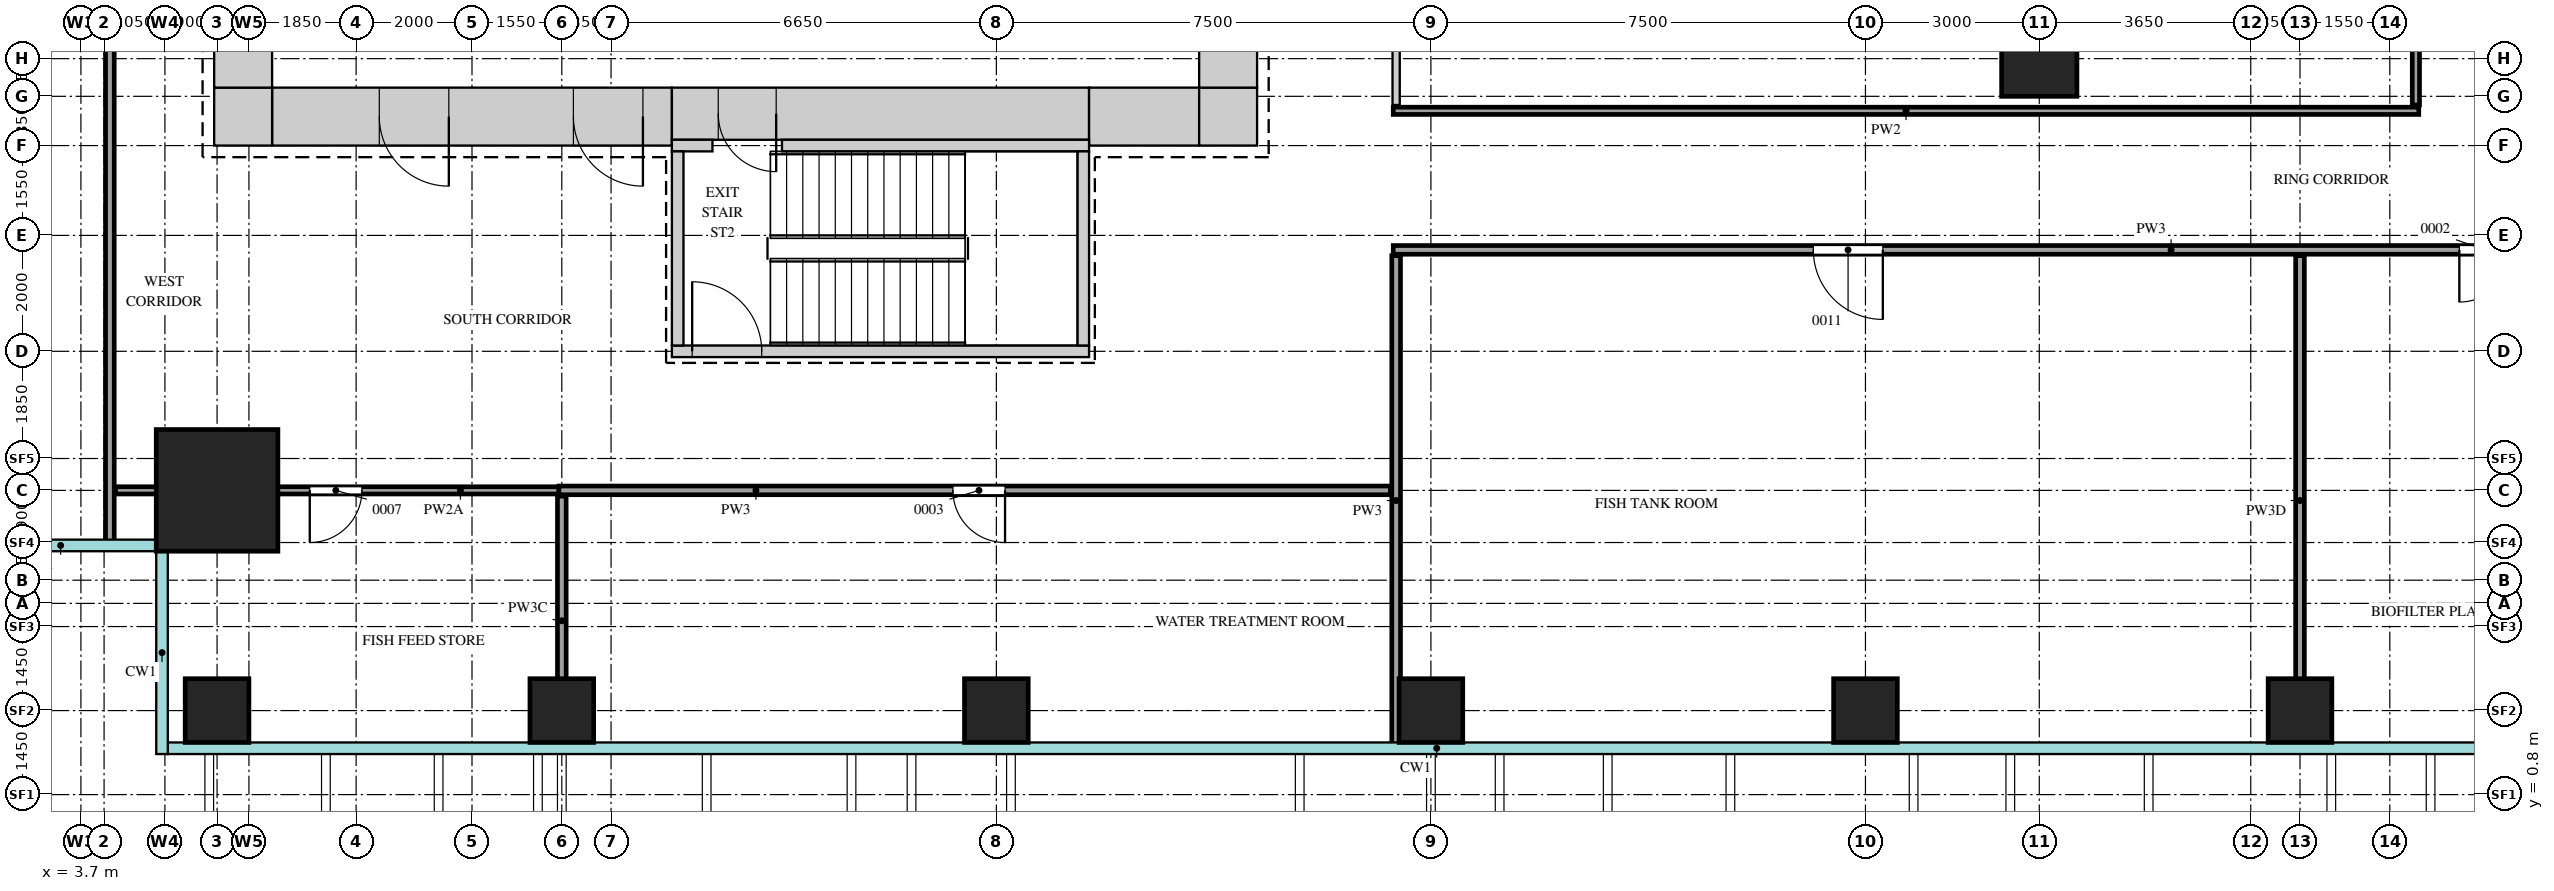
"""IFC4 building model, lengths in metres.
Left out: names, types, materials, properties, quantities, classifications, styles, units other than length and angle.
Written with IfcOpenShell. Run it as: python <this file> out.ifc"""

import sys

from ifc_helpers import new_model, si_unit, direction, frame, frame_2d, origin, origin_2d, place, context, subcontext, project, spatial, rectangle, extrude, source, transform, mapped, element, fill, save


model = new_model("IFC4")
c1 = context("Model", 3, precision=1e-05, world=origin(), true_north=direction((0.0, 1.0)))
c2 = subcontext(c1, "Body", "Model", "MODEL_VIEW")
j1 = project(units=[si_unit("LENGTHUNIT", "METRE"), si_unit("PLANEANGLEUNIT", "RADIAN")], contexts=[c1])
p1 = place(None, origin())
s1 = spatial("IfcSite", under=j1, at=p1, CompositionType="ELEMENT")
p2 = place(p1, origin())
s2 = spatial("IfcBuilding", under=s1, at=p2, CompositionType="ELEMENT")
p3 = place(p2, frame((0.0, 0.0, 141.1)))
s3 = spatial("IfcBuildingStorey", under=s2, at=p3, CompositionType="ELEMENT", Elevation=141.1)
m1 = source(origin(), c2, "Body", "SweptSolid", [
    extrude(rectangle(XDim=6.9, YDim=1.0, at=frame_2d((3.45, 0.0))), origin(), (0.0, 0.0, 1.0), 4.1),
])
p4 = place(p3, frame((7.0, 12.5, 0.0), z_axis=(0.0, 0.0, 1.0), x_axis=(1.0, 0.0, 0.0)))
e1 = element("IfcWall", 1, at=p4, inside=s3, PredefinedType="SHEAR", context=c2, shape_type="MappedRepresentation", body=[
    mapped(m1, transform((0.0, 0.0, 0.0))),
])
m2 = source(origin(), c2, "Body", "SweptSolid", [
    extrude(rectangle(XDim=1.2, YDim=2.1, at=frame_2d((0.6, 1.05))), frame((0.0, 0.51, 0.0), z_axis=(0.0, -1.0, 0.0), x_axis=(1.0, 0.0, 0.0)), (0.0, 0.0, 1.0), 1.02),
])
p5 = place(p4, frame((5.2, 0.0, 0.0)))
e2 = element("IfcOpeningElement", 2, at=p5, cuts=e1, PredefinedType="OPENING", context=c2, shape_type="MappedRepresentation", body=[
    mapped(m2, transform((0.0, 0.0, 0.0))),
])
p6 = place(p4, frame((1.85, 0.0, 0.0)))
e3 = element("IfcOpeningElement", 3, at=p6, cuts=e1, PredefinedType="OPENING", context=c2, shape_type="MappedRepresentation", body=[
    mapped(m2, transform((0.0, 0.0, 0.0))),
])
m3 = source(origin(), c2, "Body", "SweptSolid", [
    extrude(rectangle(XDim=7.2, YDim=0.9, at=frame_2d((3.6, 0.0))), origin(), (0.0, 0.0, 1.0), 4.1),
])
p7 = place(p3, frame((13.9, 12.55, 0.0), z_axis=(0.0, 0.0, 1.0), x_axis=(1.0, 0.0, 0.0)))
e4 = element("IfcWall", 4, at=p7, inside=s3, PredefinedType="SHEAR", context=c2, shape_type="MappedRepresentation", body=[
    mapped(m3, transform((0.0, 0.0, 0.0))),
])
m4 = source(origin(), c2, "Body", "SweptSolid", [
    extrude(rectangle(XDim=1.0, YDim=2.1, at=frame_2d((0.5, 1.05))), frame((0.0, 0.46, 0.0), z_axis=(0.0, -1.0, 0.0), x_axis=(1.0, 0.0, 0.0)), (0.0, 0.0, 1.0), 0.92),
])
p8 = place(p7, frame((0.8, 0.0, 0.0)))
e5 = element("IfcOpeningElement", 5, at=p8, cuts=e4, PredefinedType="OPENING", context=c2, shape_type="MappedRepresentation", body=[
    mapped(m4, transform((0.0, 0.0, 0.0))),
])
m5 = source(origin(), c2, "Body", "SweptSolid", [
    extrude(rectangle(XDim=1.9, YDim=1.0, at=frame_2d((0.95, 0.0))), origin(), (0.0, 0.0, 1.0), 4.1),
])
p9 = place(p3, frame((21.1, 12.5, 0.0), z_axis=(0.0, 0.0, 1.0), x_axis=(1.0, 0.0, 0.0)))
e6 = element("IfcWall", 6, at=p9, inside=s3, PredefinedType="SHEAR", context=c2, shape_type="MappedRepresentation", body=[
    mapped(m5, transform((0.0, 0.0, 0.0))),
])
m6 = source(origin(), c2, "Body", "SweptSolid", [
    extrude(rectangle(XDim=1.0, YDim=1.0, at=frame_2d((0.5, 0.0))), origin(), (0.0, 0.0, 1.0), 4.1),
])
for number, where, z_axis, x_axis in (
    (7, (23.0, 12.5, 0.0), (0.0, 0.0, 1.0), (1.0, 0.0, 0.0)),
    (8, (6.0, 12.5, 0.0), (0.0, 0.0, 1.0), (1.0, 0.0, 0.0)),
):
    element("IfcWall", number, at=place(p3, frame(where, z_axis=z_axis, x_axis=x_axis)), inside=s3, PredefinedType="SHEAR", context=c2, shape_type="MappedRepresentation", body=[
        mapped(m6, transform((0.0, 0.0, 0.0))),
    ])
m7 = source(origin(), c2, "Body", "SweptSolid", [
    extrude(rectangle(XDim=28.0, YDim=1.0, at=frame_2d((14.0, 0.0))), origin(), (0.0, 0.0, 1.0), 4.1),
])
p10 = place(p3, frame((23.5, 13.0, 0.0), z_axis=(0.0, 0.0, 1.0), x_axis=(0.0, 1.0, 0.0)))
e9 = element("IfcWall", 9, at=p10, inside=s3, PredefinedType="SHEAR", context=c2, shape_type="MappedRepresentation", body=[
    mapped(m7, transform((0.0, 0.0, 0.0))),
])
m8 = source(origin(), c2, "Body", "SweptSolid", [
    extrude(rectangle(XDim=1.8, YDim=2.1, at=frame_2d((0.9, 1.05))), frame((0.0, 0.51, 0.0), z_axis=(0.0, -1.0, 0.0), x_axis=(1.0, 0.0, 0.0)), (0.0, 0.0, 1.0), 1.02),
])
p11 = place(p10, frame((22.6, 0.0, 0.0)))
e10 = element("IfcOpeningElement", 10, at=p11, cuts=e9, PredefinedType="OPENING", context=c2, shape_type="MappedRepresentation", body=[
    mapped(m8, transform((0.0, 0.0, 0.0))),
])
p12 = place(p10, frame((12.35, 0.0, 0.0)))
e11 = element("IfcOpeningElement", 11, at=p12, cuts=e9, PredefinedType="OPENING", context=c2, shape_type="MappedRepresentation", body=[
    mapped(m2, transform((0.0, 0.0, 0.0))),
])
m9 = source(origin(), c2, "Body", "SweptSolid", [
    extrude(rectangle(XDim=0.9, YDim=2.1, at=frame_2d((0.45, 1.05))), frame((0.0, 0.51, 0.0), z_axis=(0.0, -1.0, 0.0), x_axis=(1.0, 0.0, 0.0)), (0.0, 0.0, 1.0), 1.02),
])
p13 = place(p10, frame((4.6, 0.0, 0.0)))
e12 = element("IfcOpeningElement", 12, at=p13, cuts=e9, PredefinedType="OPENING", context=c2, shape_type="MappedRepresentation", body=[
    mapped(m9, transform((0.0, 0.0, 0.0))),
])
p14 = place(p3, frame((6.5, 13.0, 0.0), z_axis=(0.0, 0.0, 1.0), x_axis=(0.0, 1.0, 0.0)))
e13 = element("IfcWall", 13, at=p14, inside=s3, PredefinedType="SHEAR", context=c2, shape_type="MappedRepresentation", body=[
    mapped(m7, transform((0.0, 0.0, 0.0))),
])
m10 = source(origin(), c2, "Body", "SweptSolid", [
    extrude(rectangle(XDim=0.7, YDim=0.2, at=frame_2d((0.35, 0.0))), origin(), (0.0, 0.0, 1.0), 4.1),
])
p15 = place(p3, frame((13.9, 12.0, 0.0), z_axis=(0.0, 0.0, 1.0), x_axis=(1.0, 0.0, 0.0)))
e14 = element("IfcWall", 14, at=p15, inside=s3, PredefinedType="SHEAR", context=c2, shape_type="MappedRepresentation", body=[
    mapped(m10, transform((0.0, 0.0, 0.0))),
])
m11 = source(origin(), c2, "Body", "SweptSolid", [
    extrude(rectangle(XDim=5.3, YDim=0.2, at=frame_2d((2.65, 0.0))), origin(), (0.0, 0.0, 1.0), 4.1),
])
p16 = place(p3, frame((15.8, 12.0, 0.0), z_axis=(0.0, 0.0, 1.0), x_axis=(1.0, 0.0, 0.0)))
e15 = element("IfcWall", 15, at=p16, inside=s3, PredefinedType="SHEAR", context=c2, shape_type="MappedRepresentation", body=[
    mapped(m11, transform((0.0, 0.0, 0.0))),
])
m12 = source(origin(), c2, "Body", "SweptSolid", [
    extrude(rectangle(XDim=7.2, YDim=0.2, at=frame_2d((3.6, 0.0))), origin(), (0.0, 0.0, 1.0), 4.1),
])
p17 = place(p3, frame((13.9, 8.45, 0.0), z_axis=(0.0, 0.0, 1.0), x_axis=(1.0, 0.0, 0.0)))
e16 = element("IfcWall", 16, at=p17, inside=s3, PredefinedType="SHEAR", context=c2, shape_type="MappedRepresentation", body=[
    mapped(m12, transform((0.0, 0.0, 0.0))),
])
m13 = source(origin(), c2, "Body", "SweptSolid", [
    extrude(rectangle(XDim=1.2, YDim=2.1, at=frame_2d((0.6, 1.05))), frame((0.0, 0.11, 0.0), z_axis=(0.0, -1.0, 0.0), x_axis=(1.0, 0.0, 0.0)), (0.0, 0.0, 1.0), 0.22),
])
p18 = place(p17, frame((0.35, 0.0, 0.0)))
e17 = element("IfcOpeningElement", 17, at=p18, cuts=e16, PredefinedType="OPENING", context=c2, shape_type="MappedRepresentation", body=[
    mapped(m13, transform((0.0, 0.0, 0.0))),
])
m14 = source(origin(), c2, "Body", "SweptSolid", [
    extrude(rectangle(XDim=3.35, YDim=0.2, at=frame_2d((1.675, 0.0))), origin(), (0.0, 0.0, 1.0), 4.1),
])
for number, where, z_axis, x_axis in (
    (18, (21.0, 8.55, 0.0), (0.0, 0.0, 1.0), (0.0, 1.0, 0.0)),
    (19, (14.0, 8.55, 0.0), (0.0, 0.0, 1.0), (0.0, 1.0, 0.0)),
):
    element("IfcWall", number, at=place(p3, frame(where, z_axis=z_axis, x_axis=x_axis)), inside=s3, PredefinedType="SHEAR", context=c2, shape_type="MappedRepresentation", body=[
        mapped(m14, transform((0.0, 0.0, 0.0))),
    ])
m15 = source(origin(), c2, "Body", "SweptSolid", [
    extrude(rectangle(XDim=2.1, YDim=2.1, at=origin_2d()), origin(), (0.0, 0.0, 1.0), 4.4),
])
p19 = place(p3, frame((6.05, 6.05, 0.0), z_axis=(0.0, 0.0, 1.0), x_axis=(1.0, 0.0, 0.0)))
e20 = element("IfcColumn", 20, at=p19, inside=s3, PredefinedType="COLUMN", context=c2, shape_type="MappedRepresentation", body=[
    mapped(m15, transform((0.0, 0.0, 0.0))),
])
m16 = source(origin(), c2, "Body", "SweptSolid", [
    extrude(rectangle(XDim=1.1, YDim=1.1, at=origin_2d()), origin(), (0.0, 0.0, 1.0), 4.1),
])
for number, where, z_axis, x_axis in (
    (21, (6.05, 2.25, 0.0), (0.0, 0.0, 1.0), (1.0, 0.0, 0.0)),
    (22, (12.0, 2.25, 0.0), (0.0, 0.0, 1.0), (1.0, 0.0, 0.0)),
    (23, (19.5, 2.25, 0.0), (0.0, 0.0, 1.0), (1.0, 0.0, 0.0)),
    (24, (27.0, 2.25, 0.0), (0.0, 0.0, 1.0), (1.0, 0.0, 0.0)),
    (25, (34.5, 2.25, 0.0), (0.0, 0.0, 1.0), (1.0, 0.0, 0.0)),
    (26, (42.0, 2.25, 0.0), (0.0, 0.0, 1.0), (1.0, 0.0, 0.0)),
):
    element("IfcColumn", number, at=place(p3, frame(where, z_axis=z_axis, x_axis=x_axis)), inside=s3, PredefinedType="COLUMN", context=c2, shape_type="MappedRepresentation", body=[
        mapped(m16, transform((0.0, 0.0, 0.0))),
    ])
m17 = source(origin(), c2, "Body", "SweptSolid", [
    extrude(rectangle(XDim=1.3, YDim=1.3, at=origin_2d()), origin(), (0.0, 0.0, 1.0), 4.1),
])
p20 = place(p3, frame((37.5, 13.5, 0.0), z_axis=(0.0, 0.0, 1.0), x_axis=(1.0, 0.0, 0.0)))
e27 = element("IfcColumn", 27, at=p20, inside=s3, PredefinedType="COLUMN", context=c2, shape_type="MappedRepresentation", body=[
    mapped(m17, transform((0.0, 0.0, 0.0))),
])
m18 = source(origin(), c2, "Body", "SweptSolid", [
    extrude(rectangle(XDim=4.3, YDim=0.15, at=frame_2d((2.15, 0.0))), origin(), (0.0, 0.0, 1.0), 3.65),
])
p21 = place(p3, frame((12.0, 1.65, 0.0), z_axis=(0.0, 0.0, 1.0), x_axis=(0.0, 1.0, 0.0)))
e28 = element("IfcWall", 28, at=p21, inside=s3, PredefinedType="PARTITIONING", context=c2, shape_type="MappedRepresentation", body=[
    mapped(m18, transform((0.0, 0.0, 0.0))),
])
m19 = source(origin(), c2, "Body", "SweptSolid", [
    extrude(rectangle(XDim=8.45, YDim=0.15, at=frame_2d((4.225, 0.0))), origin(), (0.0, 0.0, 1.0), 4.2),
])
p22 = place(p3, frame((26.4, 1.65, 0.0), z_axis=(0.0, 0.0, 1.0), x_axis=(0.0, 1.0, 0.0)))
e29 = element("IfcWall", 29, at=p22, inside=s3, PredefinedType="PARTITIONING", context=c2, shape_type="MappedRepresentation", body=[
    mapped(m19, transform((0.0, 0.0, 0.0))),
])
m20 = source(origin(), c2, "Body", "SweptSolid", [
    extrude(rectangle(XDim=8.45, YDim=0.15, at=frame_2d((4.225, 0.0))), origin(), (0.0, 0.0, 1.0), 3.6),
])
p23 = place(p3, frame((42.0, 1.65, 0.0), z_axis=(0.0, 0.0, 1.0), x_axis=(0.0, 1.0, 0.0)))
e30 = element("IfcWall", 30, at=p23, inside=s3, PredefinedType="PARTITIONING", context=c2, shape_type="MappedRepresentation", body=[
    mapped(m20, transform((0.0, 0.0, 0.0))),
])
m21 = source(origin(), c2, "Body", "SweptSolid", [
    extrude(rectangle(XDim=43.7, YDim=0.15, at=frame_2d((21.85, 0.0))), origin(), (0.0, 0.0, 1.0), 4.2),
])
p24 = place(p3, frame((4.2, 5.15, 0.0), z_axis=(0.0, 0.0, 1.0), x_axis=(0.0, 1.0, 0.0)))
e31 = element("IfcWall", 31, at=p24, inside=s3, PredefinedType="PARTITIONING", context=c2, shape_type="MappedRepresentation", body=[
    mapped(m21, transform((0.0, 0.0, 0.0))),
])
m22 = source(origin(), c2, "Body", "SweptSolid", [
    extrude(rectangle(XDim=0.9, YDim=2.1, at=frame_2d((0.45, 1.05))), frame((0.0, 0.085, 0.0), z_axis=(0.0, -1.0, 0.0), x_axis=(1.0, 0.0, 0.0)), (0.0, 0.0, 1.0), 0.17),
])
p25 = place(p24, frame((20.1, 0.0, 0.0)))
e32 = element("IfcOpeningElement", 32, at=p25, cuts=e31, PredefinedType="OPENING", context=c2, shape_type="MappedRepresentation", body=[
    mapped(m22, transform((0.0, 0.0, 0.0))),
])
m23 = source(origin(), c2, "Body", "SweptSolid", [
    extrude(rectangle(XDim=7.65, YDim=0.125, at=frame_2d((3.825, 0.0))), origin(), (0.0, 0.0, 1.0), 3.55),
])
p26 = place(p3, frame((4.3, 6.05, 0.0), z_axis=(0.0, 0.0, 1.0), x_axis=(1.0, 0.0, 0.0)))
e33 = element("IfcWall", 33, at=p26, inside=s3, PredefinedType="PARTITIONING", context=c2, shape_type="MappedRepresentation", body=[
    mapped(m23, transform((0.0, 0.0, 0.0))),
])
m24 = source(origin(), c2, "Body", "SweptSolid", [
    extrude(rectangle(XDim=0.9, YDim=2.1, at=frame_2d((0.45, 1.05))), frame((0.0, 0.073, 0.0), z_axis=(0.0, -1.0, 0.0), x_axis=(1.0, 0.0, 0.0)), (0.0, 0.0, 1.0), 0.145),
])
p27 = place(p26, frame((3.35, 0.0, 0.0)))
e34 = element("IfcOpeningElement", 34, at=p27, cuts=e33, PredefinedType="OPENING", context=c2, shape_type="MappedRepresentation", body=[
    mapped(m24, transform((0.0, 0.0, 0.0))),
])
m25 = source(origin(), c2, "Body", "SweptSolid", [
    extrude(rectangle(XDim=14.35, YDim=0.15, at=frame_2d((7.175, 0.0))), origin(), (0.0, 0.0, 1.0), 4.2),
])
p28 = place(p3, frame((11.95, 6.05, 0.0), z_axis=(0.0, 0.0, 1.0), x_axis=(1.0, 0.0, 0.0)))
e35 = element("IfcWall", 35, at=p28, inside=s3, PredefinedType="PARTITIONING", context=c2, shape_type="MappedRepresentation", body=[
    mapped(m25, transform((0.0, 0.0, 0.0))),
])
p29 = place(p28, frame((6.8, 0.0, 0.0)))
e36 = element("IfcOpeningElement", 36, at=p29, cuts=e35, PredefinedType="OPENING", context=c2, shape_type="MappedRepresentation", body=[
    mapped(m22, transform((0.0, 0.0, 0.0))),
])
m26 = source(origin(), c2, "Body", "SweptSolid", [
    extrude(rectangle(XDim=26.0, YDim=0.15, at=frame_2d((13.0, 0.0))), origin(), (0.0, 0.0, 1.0), 4.2),
])
p30 = place(p3, frame((26.35, 10.2, 0.0), z_axis=(0.0, 0.0, 1.0), x_axis=(1.0, 0.0, 0.0)))
e37 = element("IfcWall", 37, at=p30, inside=s3, PredefinedType="PARTITIONING", context=c2, shape_type="MappedRepresentation", body=[
    mapped(m26, transform((0.0, 0.0, 0.0))),
])
m27 = source(origin(), c2, "Body", "SweptSolid", [
    extrude(rectangle(XDim=1.2, YDim=2.1, at=frame_2d((0.6, 1.05))), frame((0.0, 0.085, 0.0), z_axis=(0.0, -1.0, 0.0), x_axis=(1.0, 0.0, 0.0)), (0.0, 0.0, 1.0), 0.17),
])
p31 = place(p30, frame((7.25, 0.0, 0.0)))
e38 = element("IfcOpeningElement", 38, at=p31, cuts=e37, PredefinedType="OPENING", context=c2, shape_type="MappedRepresentation", body=[
    mapped(m27, transform((0.0, 0.0, 0.0))),
])
p32 = place(p30, frame((18.4, 0.0, 0.0)))
e39 = element("IfcOpeningElement", 39, at=p32, cuts=e37, PredefinedType="OPENING", context=c2, shape_type="MappedRepresentation", body=[
    mapped(m22, transform((0.0, 0.0, 0.0))),
])
m28 = source(origin(), c2, "Body", "SweptSolid", [
    extrude(rectangle(XDim=17.7, YDim=0.125, at=frame_2d((8.85, 0.0))), origin(), (0.0, 0.0, 1.0), 4.2),
])
p33 = place(p3, frame((26.35, 12.6, 0.0), z_axis=(0.0, 0.0, 1.0), x_axis=(1.0, 0.0, 0.0)))
e40 = element("IfcWall", 40, at=p33, inside=s3, PredefinedType="PARTITIONING", context=c2, shape_type="MappedRepresentation", body=[
    mapped(m28, transform((0.0, 0.0, 0.0))),
])
m29 = source(origin(), c2, "Body", "SweptSolid", [
    extrude(rectangle(XDim=23.2, YDim=0.125, at=frame_2d((11.6, 0.0))), origin(), (0.0, 0.0, 1.0), 4.2),
])
p34 = place(p3, frame((26.4, 12.7, 0.0), z_axis=(0.0, 0.0, 1.0), x_axis=(0.0, 1.0, 0.0)))
e41 = element("IfcWall", 41, at=p34, inside=s3, PredefinedType="PARTITIONING", context=c2, shape_type="MappedRepresentation", body=[
    mapped(m29, transform((0.0, 0.0, 0.0))),
])
p35 = place(p34, frame((2.15, 0.0, 0.0)))
e42 = element("IfcOpeningElement", 42, at=p35, cuts=e41, PredefinedType="OPENING", context=c2, shape_type="MappedRepresentation", body=[
    mapped(m24, transform((0.0, 0.0, 0.0))),
])
m30 = source(origin(), c2, "Body", "SweptSolid", [
    extrude(rectangle(XDim=32.85, YDim=0.125, at=frame_2d((16.425, 0.0))), origin(), (0.0, 0.0, 1.0), 4.2),
])
p36 = place(p3, frame((44.0, 12.7, 0.0), z_axis=(0.0, 0.0, 1.0), x_axis=(0.0, 1.0, 0.0)))
e43 = element("IfcWall", 43, at=p36, inside=s3, PredefinedType="PARTITIONING", context=c2, shape_type="MappedRepresentation", body=[
    mapped(m30, transform((0.0, 0.0, 0.0))),
])
m31 = source(origin(), c2, "Body", "SweptSolid", [
    extrude(rectangle(XDim=1.2, YDim=2.1, at=frame_2d((0.6, 1.05))), frame((0.0, 0.073, 0.0), z_axis=(0.0, -1.0, 0.0), x_axis=(1.0, 0.0, 0.0)), (0.0, 0.0, 1.0), 0.145),
])
p37 = place(p36, frame((13.7, 0.0, 0.0)))
e44 = element("IfcOpeningElement", 44, at=p37, cuts=e43, PredefinedType="OPENING", context=c2, shape_type="MappedRepresentation", body=[
    mapped(m31, transform((0.0, 0.0, 0.0))),
])
p38 = place(p36, frame((27.5, 0.0, 0.0)))
e45 = element("IfcOpeningElement", 45, at=p38, cuts=e43, PredefinedType="OPENING", context=c2, shape_type="MappedRepresentation", body=[
    mapped(m31, transform((0.0, 0.0, 0.0))),
])
m32 = source(origin(), c2, "Body", "SweptSolid", [
    extrude(rectangle(XDim=1.2, YDim=2.1, at=frame_2d((0.6, 1.05))), frame((0.0, 0.45, 0.0), z_axis=(0.0, -1.0, 0.0), x_axis=(1.0, 0.0, 0.0)), (0.0, 0.0, 1.0), 0.9),
])
p39 = place(p5, origin())
e46 = element("IfcDoor", 46, at=p39, inside=s3, OperationType="SINGLE_SWING_RIGHT", PredefinedType="DOOR", context=c2, shape_type="MappedRepresentation", body=[
    mapped(m32, transform((0.0, 0.0, 0.0))),
])
fill(e2, e46)
p40 = place(p6, origin())
e47 = element("IfcDoor", 47, at=p40, inside=s3, OperationType="SINGLE_SWING_RIGHT", PredefinedType="DOOR", context=c2, shape_type="MappedRepresentation", body=[
    mapped(m32, transform((0.0, 0.0, 0.0))),
])
fill(e3, e47)
m33 = source(origin(), c2, "Body", "SweptSolid", [
    extrude(rectangle(XDim=1.0, YDim=2.1, at=frame_2d((0.5, 1.05))), frame((0.0, 0.4, 0.0), z_axis=(0.0, -1.0, 0.0), x_axis=(1.0, 0.0, 0.0)), (0.0, 0.0, 1.0), 0.8),
])
p41 = place(p8, origin())
e48 = element("IfcDoor", 48, at=p41, inside=s3, OperationType="SINGLE_SWING_RIGHT", PredefinedType="DOOR", context=c2, shape_type="MappedRepresentation", body=[
    mapped(m33, transform((0.0, 0.0, 0.0))),
])
fill(e5, e48)
m34 = source(origin(), c2, "Body", "SweptSolid", [
    extrude(rectangle(XDim=1.2, YDim=2.1, at=frame_2d((0.6, 1.05))), frame((0.0, 0.025, 0.0), z_axis=(0.0, -1.0, 0.0), x_axis=(1.0, 0.0, 0.0)), (0.0, 0.0, 1.0), 0.05),
])
p42 = place(p31, origin())
e49 = element("IfcDoor", 49, at=p42, inside=s3, OperationType="SINGLE_SWING_RIGHT", PredefinedType="DOOR", context=c2, shape_type="MappedRepresentation", body=[
    mapped(m34, transform((0.0, 0.0, 0.0))),
])
fill(e38, e49)
m35 = source(origin(), c2, "Body", "SweptSolid", [
    extrude(rectangle(XDim=0.9, YDim=2.1, at=frame_2d((0.45, 1.05))), frame((0.0, 0.025, 0.0), z_axis=(0.0, -1.0, 0.0), x_axis=(1.0, 0.0, 0.0)), (0.0, 0.0, 1.0), 0.05),
])
p43 = place(p32, origin())
e50 = element("IfcDoor", 50, at=p43, inside=s3, OperationType="SINGLE_SWING_LEFT", PredefinedType="DOOR", context=c2, shape_type="MappedRepresentation", body=[
    mapped(m35, transform((0.0, 0.0, 0.0))),
])
fill(e39, e50)
p44 = place(p27, origin())
e51 = element("IfcDoor", 51, at=p44, inside=s3, OperationType="SINGLE_SWING_LEFT", PredefinedType="DOOR", context=c2, shape_type="MappedRepresentation", body=[
    mapped(m35, transform((0.0, 0.0, 0.0))),
])
fill(e34, e51)
p45 = place(p29, origin())
e52 = element("IfcDoor", 52, at=p45, inside=s3, OperationType="SINGLE_SWING_RIGHT", PredefinedType="DOOR", context=c2, shape_type="MappedRepresentation", body=[
    mapped(m35, transform((0.0, 0.0, 0.0))),
])
fill(e36, e52)
p46 = place(p18, origin())
e53 = element("IfcDoor", 53, at=p46, inside=s3, OperationType="SINGLE_SWING_RIGHT", PredefinedType="DOOR", context=c2, shape_type="MappedRepresentation", body=[
    mapped(m34, transform((0.0, 0.0, 0.0))),
])
fill(e17, e53)
save(model, sys.argv[1])
